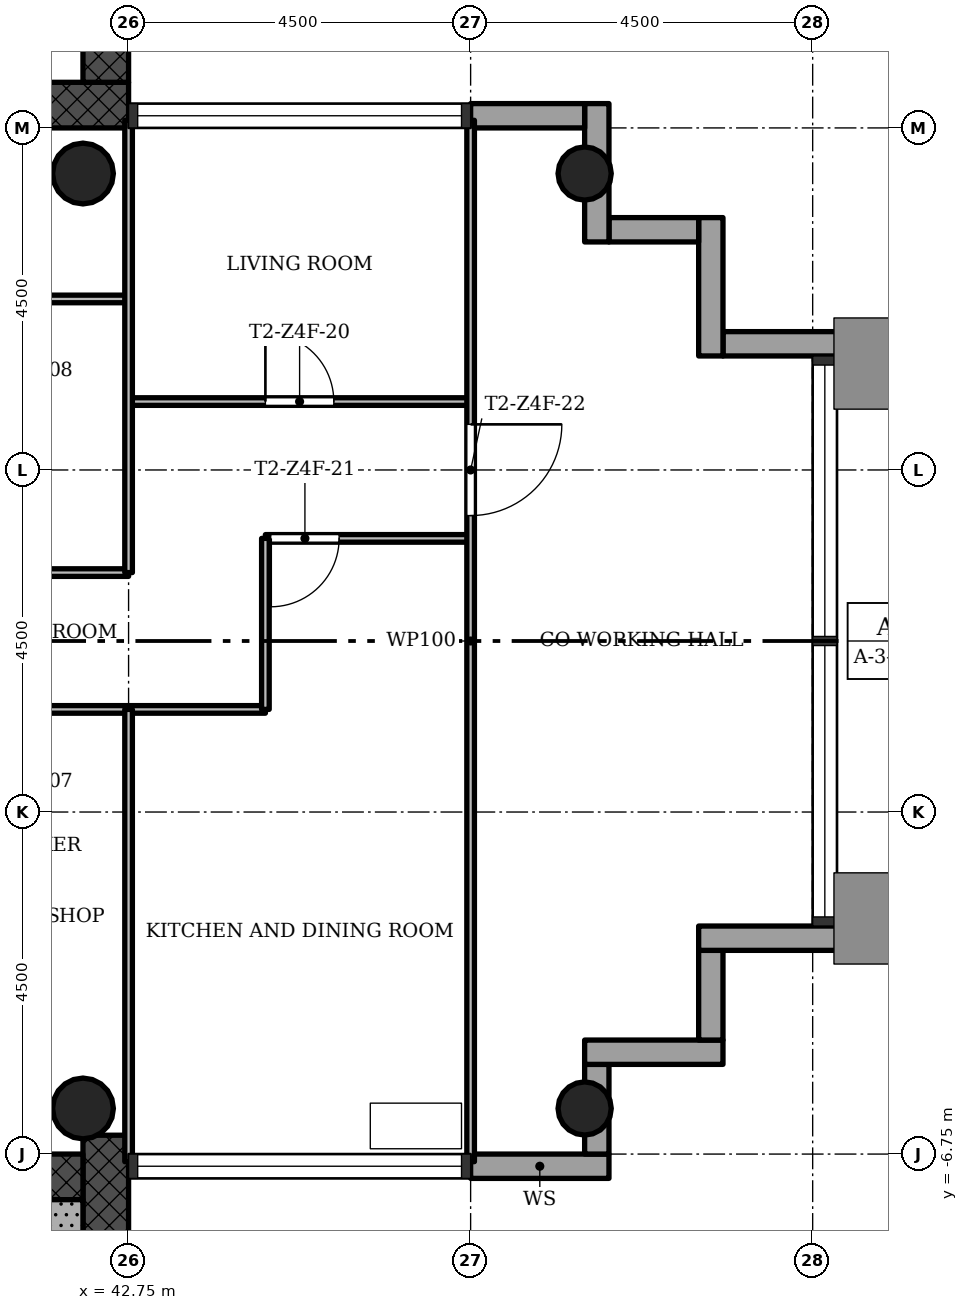
"""IFC4 building model, lengths in metres.
Left out: names, types, materials, properties, quantities, classifications, styles, units other than length and angle.
Written with IfcOpenShell. Run it as: python <this file> out.ifc"""

import sys

from ifc_helpers import new_model, si_unit, direction, frame, frame_2d, origin, origin_2d, place, context, subcontext, project, spatial, rectangle, hollow_circle, extrude, element, fill, save


model = new_model("IFC4")
c1 = context("Model", 3, precision=1e-05, world=origin(), true_north=direction((0.0, 1.0)))
c2 = subcontext(c1, "Body", "Model", "MODEL_VIEW")
j1 = project(units=[si_unit("LENGTHUNIT", "METRE"), si_unit("PLANEANGLEUNIT", "RADIAN")], contexts=[c1])
p1 = place(None, origin())
s1 = spatial("IfcSite", under=j1, at=p1, CompositionType="ELEMENT")
p2 = place(p1, origin())
s2 = spatial("IfcBuilding", under=s1, at=p2, CompositionType="ELEMENT")
p3 = place(p2, frame((0.0, 0.0, 223.2)))
s3 = spatial("IfcBuildingStorey", under=s2, at=p3, CompositionType="ELEMENT", Elevation=223.2)
p4 = place(p3, frame((29.85, 7.05, 0.0), z_axis=(0.0, 0.0, 1.0), x_axis=(1.0, 0.0, 0.0)))
e1 = element("IfcWall", 1, at=p4, inside=s3, PredefinedType="SHEAR", context=c2, shape_type="SweptSolid", body=[
    extrude(rectangle(XDim=12.9, YDim=0.6, at=frame_2d((6.45, 0.0))), origin(), (0.0, 0.0, 1.0), 3.4),
])
p5 = place(p4, frame((5.25, 0.0, 0.0)))
e2 = element("IfcOpeningElement", 2, at=p5, cuts=e1, PredefinedType="OPENING", context=c2, shape_type="SweptSolid", body=[
    extrude(rectangle(XDim=1.8, YDim=2.1, at=frame_2d((0.9, 1.05))), frame((0.0, 0.31, 0.0), z_axis=(0.0, -1.0, 0.0), x_axis=(1.0, 0.0, 0.0)), (0.0, 0.0, 1.0), 0.62),
])
p6 = place(p3, frame((42.45, 7.35, 0.0), z_axis=(0.0, 0.0, 1.0), x_axis=(0.0, 1.0, 0.0)))
e3 = element("IfcWall", 3, at=p6, inside=s3, PredefinedType="SHEAR", context=c2, shape_type="SweptSolid", body=[
    extrude(rectangle(XDim=8.4, YDim=0.6, at=frame_2d((4.2, 0.0))), origin(), (0.0, 0.0, 1.0), 3.4),
])
p7 = place(p3, frame((42.45, -15.15, 0.0), z_axis=(0.0, 0.0, 1.0), x_axis=(0.0, 1.0, 0.0)))
e4 = element("IfcWall", 4, at=p7, inside=s3, PredefinedType="SHEAR", context=c2, shape_type="SweptSolid", body=[
    extrude(rectangle(XDim=8.648, YDim=0.6, at=frame_2d((4.324, 0.0))), origin(), (0.0, 0.0, 1.0), 3.4),
])
p8 = place(p3, frame((42.15, -7.05, 0.0), z_axis=(0.0, 0.0, 1.0), x_axis=(-1.0, 0.0, 0.0)))
e5 = element("IfcWall", 5, at=p8, inside=s3, PredefinedType="SHEAR", context=c2, shape_type="SweptSolid", body=[
    extrude(rectangle(XDim=12.9, YDim=0.6, at=frame_2d((6.45, 0.0))), origin(), (0.0, 0.0, 1.0), 3.4),
])
p9 = place(p8, frame((5.25, 0.0, 0.0)))
e6 = element("IfcOpeningElement", 6, at=p9, cuts=e5, PredefinedType="OPENING", context=c2, shape_type="SweptSolid", body=[
    extrude(rectangle(XDim=1.8, YDim=2.1, at=frame_2d((0.9, 1.05))), frame((0.0, 0.31, 0.0), z_axis=(0.0, -1.0, 0.0), x_axis=(1.0, 0.0, 0.0)), (0.0, 0.0, 1.0), 0.62),
])
for number, where, z_axis, x_axis in (
    (7, (48.75, -6.15, 0.0), (0.0, 0.0, 1.0), (1.0, 0.0, 0.0)),
    (8, (48.75, 6.15, 0.0), (0.0, 0.0, 1.0), (1.0, 0.0, 0.0)),
):
    element("IfcColumn", number, at=place(p3, frame(where, z_axis=z_axis, x_axis=x_axis)), inside=s3, PredefinedType="COLUMN", context=c2, shape_type="SweptSolid", body=[
        extrude(hollow_circle(Radius=0.35, WallThickness=0.025, at=origin_2d()), origin(), (0.0, 0.0, 1.0), 3.4),
    ])
for number, where, z_axis, x_axis in (
    (9, (42.15, -6.15, 0.0), (0.0, 0.0, 1.0), (1.0, 0.0, 0.0)),
    (10, (42.15, 6.15, 0.0), (0.0, 0.0, 1.0), (1.0, 0.0, 0.0)),
):
    element("IfcColumn", number, at=place(p3, frame(where, z_axis=z_axis, x_axis=x_axis)), inside=s3, PredefinedType="COLUMN", context=c2, shape_type="SweptSolid", body=[
        extrude(hollow_circle(Radius=0.4, WallThickness=0.028, at=origin_2d()), origin(), (0.0, 0.0, 1.0), 3.4),
    ])
p10 = place(p3, frame((47.25, -6.91, -0.3), z_axis=(0.0, 0.0, 1.0), x_axis=(1.0, 0.0, 0.0)))
e11 = element("IfcWall", 11, at=p10, inside=s3, PredefinedType="STANDARD", context=c2, shape_type="SweptSolid", body=[
    extrude(rectangle(XDim=1.82, YDim=0.32, at=frame_2d((0.91, 0.0))), origin(), (0.0, 0.0, 1.0), 3.4),
])
p11 = place(p3, frame((48.91, -6.75, -0.3), z_axis=(0.0, 0.0, 1.0), x_axis=(0.0, 1.0, 0.0)))
e12 = element("IfcWall", 12, at=p11, inside=s3, PredefinedType="STANDARD", context=c2, shape_type="SweptSolid", body=[
    extrude(rectangle(XDim=1.18, YDim=0.32, at=frame_2d((0.59, 0.0))), origin(), (0.0, 0.0, 1.0), 3.4),
])
p12 = place(p3, frame((48.75, -5.41, -0.3), z_axis=(0.0, 0.0, 1.0), x_axis=(1.0, 0.0, 0.0)))
e13 = element("IfcWall", 13, at=p12, inside=s3, PredefinedType="STANDARD", context=c2, shape_type="SweptSolid", body=[
    extrude(rectangle(XDim=1.82, YDim=0.32, at=frame_2d((0.91, 0.0))), origin(), (0.0, 0.0, 1.0), 3.4),
])
p13 = place(p3, frame((50.41, -5.25, -0.3), z_axis=(0.0, 0.0, 1.0), x_axis=(0.0, 1.0, 0.0)))
e14 = element("IfcWall", 14, at=p13, inside=s3, PredefinedType="STANDARD", context=c2, shape_type="SweptSolid", body=[
    extrude(rectangle(XDim=1.18, YDim=0.32, at=frame_2d((0.59, 0.0))), origin(), (0.0, 0.0, 1.0), 3.4),
])
p14 = place(p3, frame((50.25, -3.91, -0.3), z_axis=(0.0, 0.0, 1.0), x_axis=(1.0, 0.0, 0.0)))
e15 = element("IfcWall", 15, at=p14, inside=s3, PredefinedType="STANDARD", context=c2, shape_type="SweptSolid", body=[
    extrude(rectangle(XDim=1.82, YDim=0.32, at=frame_2d((0.91, 0.0))), origin(), (0.0, 0.0, 1.0), 3.4),
])
p15 = place(p3, frame((52.07, 3.91, -0.3), z_axis=(0.0, 0.0, 1.0), x_axis=(-1.0, 0.0, 0.0)))
e16 = element("IfcWall", 16, at=p15, inside=s3, PredefinedType="STANDARD", context=c2, shape_type="SweptSolid", body=[
    extrude(rectangle(XDim=1.5, YDim=0.32, at=frame_2d((0.75, 0.0))), origin(), (0.0, 0.0, 1.0), 3.4),
])
p16 = place(p3, frame((50.41, 3.75, -0.3), z_axis=(0.0, 0.0, 1.0), x_axis=(0.0, 1.0, 0.0)))
e17 = element("IfcWall", 17, at=p16, inside=s3, PredefinedType="STANDARD", context=c2, shape_type="SweptSolid", body=[
    extrude(rectangle(XDim=1.82, YDim=0.32, at=frame_2d((0.91, 0.0))), origin(), (0.0, 0.0, 1.0), 3.4),
])
p17 = place(p3, frame((50.25, 5.41, -0.3), z_axis=(0.0, 0.0, 1.0), x_axis=(-1.0, 0.0, 0.0)))
e18 = element("IfcWall", 18, at=p17, inside=s3, PredefinedType="STANDARD", context=c2, shape_type="SweptSolid", body=[
    extrude(rectangle(XDim=1.18, YDim=0.32, at=frame_2d((0.59, 0.0))), origin(), (0.0, 0.0, 1.0), 3.4),
])
p18 = place(p3, frame((48.91, 5.25, -0.3), z_axis=(0.0, 0.0, 1.0), x_axis=(0.0, 1.0, 0.0)))
e19 = element("IfcWall", 19, at=p18, inside=s3, PredefinedType="STANDARD", context=c2, shape_type="SweptSolid", body=[
    extrude(rectangle(XDim=1.82, YDim=0.32, at=frame_2d((0.91, 0.0))), origin(), (0.0, 0.0, 1.0), 3.4),
])
p19 = place(p3, frame((48.75, 6.91, -0.3), z_axis=(0.0, 0.0, 1.0), x_axis=(-1.0, 0.0, 0.0)))
e20 = element("IfcWall", 20, at=p19, inside=s3, PredefinedType="STANDARD", context=c2, shape_type="SweptSolid", body=[
    extrude(rectangle(XDim=1.5, YDim=0.32, at=frame_2d((0.75, 0.0))), origin(), (0.0, 0.0, 1.0), 3.4),
])
p20 = place(p3, frame((44.55, -0.9, 0.0), z_axis=(0.0, 0.0, 1.0), x_axis=(-1.0, 0.0, 0.0)))
e21 = element("IfcWall", 21, at=p20, inside=s3, PredefinedType="PARTITIONING", context=c2, shape_type="SweptSolid", body=[
    extrude(rectangle(XDim=4.05, YDim=0.1, at=frame_2d((2.025, 0.0))), origin(), (0.0, 0.0, 1.0), 3.0),
])
p21 = place(p3, frame((42.75, 0.9, 0.0), z_axis=(0.0, 0.0, 1.0), x_axis=(-1.0, 0.0, 0.0)))
e22 = element("IfcWall", 22, at=p21, inside=s3, PredefinedType="PARTITIONING", context=c2, shape_type="SweptSolid", body=[
    extrude(rectangle(XDim=2.25, YDim=0.1, at=frame_2d((1.125, 0.0))), origin(), (0.0, 0.0, 1.0), 3.0),
])
p22 = place(p3, frame((47.25, 1.35, 0.0), z_axis=(0.0, 0.0, 1.0), x_axis=(-1.0, 0.0, 0.0)))
e23 = element("IfcWall", 23, at=p22, inside=s3, PredefinedType="PARTITIONING", context=c2, shape_type="SweptSolid", body=[
    extrude(rectangle(XDim=2.7, YDim=0.1, at=frame_2d((1.35, 0.0))), origin(), (0.0, 0.0, 1.0), 3.0),
])
p23 = place(p22, frame((1.73, 0.0, 0.0)))
e24 = element("IfcOpeningElement", 24, at=p23, cuts=e23, PredefinedType="OPENING", context=c2, shape_type="SweptSolid", body=[
    extrude(rectangle(XDim=0.9, YDim=2.1, at=frame_2d((0.45, 1.05))), frame((0.0, 0.06, 0.0), z_axis=(0.0, -1.0, 0.0), x_axis=(1.0, 0.0, 0.0)), (0.0, 0.0, 1.0), 0.12),
])
p24 = place(p3, frame((47.25, 3.15, 0.0), z_axis=(0.0, 0.0, 1.0), x_axis=(-1.0, 0.0, 0.0)))
e25 = element("IfcWall", 25, at=p24, inside=s3, PredefinedType="PARTITIONING", context=c2, shape_type="SweptSolid", body=[
    extrude(rectangle(XDim=4.5, YDim=0.1, at=frame_2d((2.25, 0.0))), origin(), (0.0, 0.0, 1.0), 3.0),
])
p25 = place(p24, frame((1.8, 0.0, 0.0)))
e26 = element("IfcOpeningElement", 26, at=p25, cuts=e25, PredefinedType="OPENING", context=c2, shape_type="SweptSolid", body=[
    extrude(rectangle(XDim=0.9, YDim=2.1, at=frame_2d((0.45, 1.05))), frame((0.0, 0.06, 0.0), z_axis=(0.0, -1.0, 0.0), x_axis=(1.0, 0.0, 0.0)), (0.0, 0.0, 1.0), 0.12),
])
p26 = place(p3, frame((42.75, 4.5, 0.0), z_axis=(0.0, 0.0, 1.0), x_axis=(-1.0, 0.0, 0.0)))
e27 = element("IfcWall", 27, at=p26, inside=s3, PredefinedType="PARTITIONING", context=c2, shape_type="SweptSolid", body=[
    extrude(rectangle(XDim=5.25, YDim=0.1, at=frame_2d((2.625, 0.0))), origin(), (0.0, 0.0, 1.0), 3.0),
])
p27 = place(p26, frame((3.3, 0.0, 0.0)))
e28 = element("IfcOpeningElement", 28, at=p27, cuts=e27, PredefinedType="OPENING", context=c2, shape_type="SweptSolid", body=[
    extrude(rectangle(XDim=0.9, YDim=2.1, at=frame_2d((0.45, 1.05))), frame((0.0, 0.06, 0.0), z_axis=(0.0, -1.0, 0.0), x_axis=(1.0, 0.0, 0.0)), (0.0, 0.0, 1.0), 0.12),
])
p28 = place(p3, frame((47.25, -6.85, 0.0), z_axis=(0.0, 0.0, 1.0), x_axis=(0.0, 1.0, 0.0)))
e29 = element("IfcWall", 29, at=p28, inside=s3, PredefinedType="PARTITIONING", context=c2, shape_type="SweptSolid", body=[
    extrude(rectangle(XDim=13.7, YDim=0.1, at=frame_2d((6.85, 0.0))), origin(), (0.0, 0.0, 1.0), 3.0),
])
p29 = place(p28, frame((8.5, 0.0, 0.0)))
e30 = element("IfcOpeningElement", 30, at=p29, cuts=e29, PredefinedType="OPENING", context=c2, shape_type="SweptSolid", body=[
    extrude(rectangle(XDim=1.2, YDim=2.1, at=frame_2d((0.6, 1.05))), frame((0.0, 0.06, 0.0), z_axis=(0.0, -1.0, 0.0), x_axis=(1.0, 0.0, 0.0)), (0.0, 0.0, 1.0), 0.12),
])
p30 = place(p3, frame((44.55, -0.9, 0.0), z_axis=(0.0, 0.0, 1.0), x_axis=(0.0, 1.0, 0.0)))
e31 = element("IfcWall", 31, at=p30, inside=s3, PredefinedType="PARTITIONING", context=c2, shape_type="SweptSolid", body=[
    extrude(rectangle(XDim=2.25, YDim=0.1, at=frame_2d((1.125, 0.0))), origin(), (0.0, 0.0, 1.0), 3.0),
])
for number, where, z_axis, x_axis in (
    (32, (42.75, -6.85, 0.0), (0.0, 0.0, 1.0), (0.0, 1.0, 0.0)),
    (33, (42.75, 0.9, 0.0), (0.0, 0.0, 1.0), (0.0, 1.0, 0.0)),
):
    element("IfcWall", number, at=place(p3, frame(where, z_axis=z_axis, x_axis=x_axis)), inside=s3, PredefinedType="PARTITIONING", context=c2, shape_type="SweptSolid", body=[
        extrude(rectangle(XDim=5.95, YDim=0.1, at=frame_2d((2.975, 0.0))), origin(), (0.0, 0.0, 1.0), 3.0),
    ])
p31 = place(p3, frame((37.85, -7.65, 0.0), z_axis=(0.0, 0.0, 1.0), x_axis=(1.0, 0.0, 0.0)))
e34 = element("IfcWall", 34, at=p31, inside=s3, PredefinedType="SHEAR", context=c2, shape_type="SweptSolid", body=[
    extrude(rectangle(XDim=4.3, YDim=0.6, at=frame_2d((2.15, 0.0))), origin(), (0.0, 0.0, 1.0), 3.4),
])
p32 = place(p25, origin())
e35 = element("IfcDoor", 35, at=p32, inside=s3, OperationType="SINGLE_SWING_RIGHT", PredefinedType="DOOR", context=c2, shape_type="SweptSolid", body=[
    extrude(rectangle(XDim=0.9, YDim=2.1, at=frame_2d((0.45, 1.05))), frame((0.0, 0.025, 0.0), z_axis=(0.0, -1.0, 0.0), x_axis=(1.0, 0.0, 0.0)), (0.0, 0.0, 1.0), 0.05),
])
fill(e26, e35)
p33 = place(p23, origin())
e36 = element("IfcDoor", 36, at=p33, inside=s3, OperationType="SINGLE_SWING_LEFT", PredefinedType="DOOR", context=c2, shape_type="SweptSolid", body=[
    extrude(rectangle(XDim=0.9, YDim=2.1, at=frame_2d((0.45, 1.05))), frame((0.0, 0.025, 0.0), z_axis=(0.0, -1.0, 0.0), x_axis=(1.0, 0.0, 0.0)), (0.0, 0.0, 1.0), 0.05),
])
fill(e24, e36)
p34 = place(p29, origin())
e37 = element("IfcDoor", 37, at=p34, inside=s3, OperationType="SINGLE_SWING_RIGHT", PredefinedType="DOOR", context=c2, shape_type="SweptSolid", body=[
    extrude(rectangle(XDim=1.2, YDim=2.1, at=frame_2d((0.6, 1.05))), frame((0.0, 0.025, 0.0), z_axis=(0.0, -1.0, 0.0), x_axis=(1.0, 0.0, 0.0)), (0.0, 0.0, 1.0), 0.05),
])
fill(e30, e37)
save(model, sys.argv[1])
